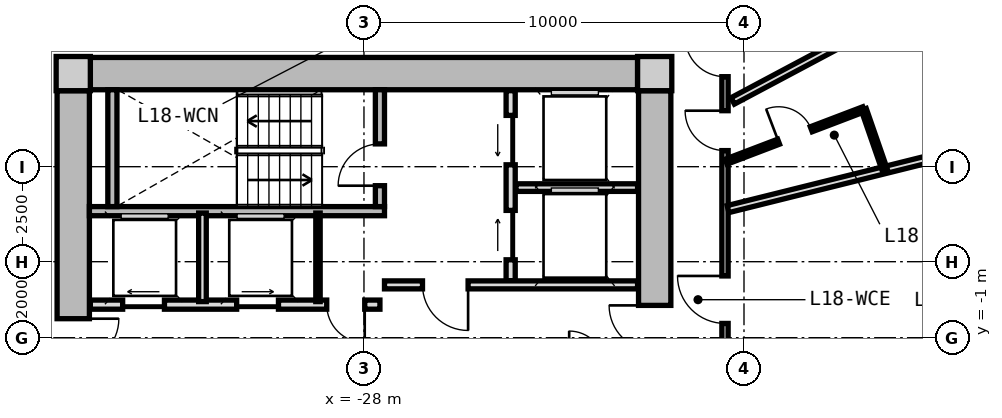
"""IFC4 building model, lengths in metres.
Left out: names, types, materials, properties, quantities, classifications, styles, units other than length and angle.
Written with IfcOpenShell. Run it as: python <this file> out.ifc"""

import sys

from ifc_helpers import new_model, si_unit, direction, frame, frame_2d, origin, origin_2d, place, context, subcontext, project, spatial, rectangle, extrude, source, transform, mapped, element, fill, save


model = new_model("IFC4")
c1 = context("Model", 3, precision=1e-05, world=origin(), true_north=direction((0.0, 1.0)))
c2 = subcontext(c1, "Body", "Model", "MODEL_VIEW")
j1 = project(units=[si_unit("LENGTHUNIT", "METRE"), si_unit("PLANEANGLEUNIT", "RADIAN")], contexts=[c1])
p1 = place(None, origin())
s1 = spatial("IfcSite", under=j1, at=p1, CompositionType="ELEMENT")
p2 = place(p1, origin())
s2 = spatial("IfcBuilding", under=s1, at=p2, CompositionType="ELEMENT")
p3 = place(p2, frame((0.0, 0.0, 61.25)))
s3 = spatial("IfcBuildingStorey", under=s2, at=p3, CompositionType="ELEMENT", Elevation=61.25)
m1 = source(origin(), c2, "Body", "SweptSolid", [
    extrude(rectangle(XDim=0.9, YDim=0.9, at=origin_2d()), origin(), (0.0, 0.0, 1.0), 3.05),
])
for number, where, z_axis, x_axis in (
    (1, (-20.35, 5.95, 0.0), (0.0, 0.0, 1.0), (1.0, 0.0, 0.0)),
    (2, (-35.65, 5.95, 0.0), (0.0, 0.0, 1.0), (1.0, 0.0, 0.0)),
):
    element("IfcColumn", number, at=place(p3, frame(where, z_axis=z_axis, x_axis=x_axis)), inside=s3, PredefinedType="COLUMN", context=c2, shape_type="MappedRepresentation", body=[
        mapped(m1, transform((0.0, 0.0, 0.0), x_axis=(1.0, 0.0, 0.0), y_axis=(0.0, 1.0, 0.0), z_axis=(0.0, 0.0, 1.0), scale=1.0)),
    ])
m2 = source(origin(), c2, "Body", "SweptSolid", [
    extrude(rectangle(XDim=14.4, YDim=0.85, at=frame_2d((7.2, 0.0))), origin(), (0.0, 0.0, 1.0), 2.79),
])
p4 = place(p3, frame((-35.2, 5.95, 0.0), z_axis=(0.0, 0.0, 1.0), x_axis=(1.0, 0.0, 0.0)))
e3 = element("IfcWall", 3, at=p4, inside=s3, PredefinedType="SHEAR", context=c2, shape_type="MappedRepresentation", body=[
    mapped(m2, transform((0.0, 0.0, 0.0), x_axis=(1.0, 0.0, 0.0), y_axis=(0.0, 1.0, 0.0), z_axis=(0.0, 0.0, 1.0), scale=1.0)),
])
m3 = source(origin(), c2, "Body", "SweptSolid", [
    extrude(rectangle(XDim=11.0, YDim=0.85, at=frame_2d((5.5, 0.0))), origin(), (0.0, 0.0, 1.0), 2.79),
])
p5 = place(p3, frame((-35.65, -5.5, 0.0), z_axis=(0.0, 0.0, 1.0), x_axis=(0.0, 1.0, 0.0)))
e4 = element("IfcWall", 4, at=p5, inside=s3, PredefinedType="SHEAR", context=c2, shape_type="MappedRepresentation", body=[
    mapped(m3, transform((0.0, 0.0, 0.0), x_axis=(1.0, 0.0, 0.0), y_axis=(0.0, 1.0, 0.0), z_axis=(0.0, 0.0, 1.0), scale=1.0)),
])
p6 = place(p5, frame((3.8, 0.0, 0.0)))
e5 = element("IfcOpeningElement", 5, at=p6, cuts=e4, PredefinedType="OPENING", context=c2, shape_type="SweptSolid", body=[
    extrude(rectangle(XDim=1.2, YDim=2.15, at=frame_2d((0.6, 1.075))), frame((0.0, 0.435, 0.0), z_axis=(0.0, -1.0, 0.0), x_axis=(1.0, 0.0, 0.0)), (0.0, 0.0, 1.0), 0.87),
])
p7 = place(p3, frame((-20.35, 5.5, 0.0), z_axis=(0.0, 0.0, 1.0), x_axis=(0.0, -1.0, 0.0)))
e6 = element("IfcWall", 6, at=p7, inside=s3, PredefinedType="SHEAR", context=c2, shape_type="MappedRepresentation", body=[
    mapped(m3, transform((0.0, 0.0, 0.0), x_axis=(1.0, 0.0, 0.0), y_axis=(0.0, 1.0, 0.0), z_axis=(0.0, 0.0, 1.0), scale=1.0)),
])
p8 = place(p7, frame((5.65, 0.0, 0.0)))
e7 = element("IfcOpeningElement", 7, at=p8, cuts=e6, PredefinedType="OPENING", context=c2, shape_type="SweptSolid", body=[
    extrude(rectangle(XDim=1.2, YDim=2.15, at=frame_2d((0.6, 1.075))), frame((0.0, 0.435, 0.0), z_axis=(0.0, -1.0, 0.0), x_axis=(1.0, 0.0, 0.0)), (0.0, 0.0, 1.0), 0.87),
])
m4 = source(origin(), c2, "Body", "SweptSolid", [
    extrude(rectangle(XDim=7.765, YDim=0.24, at=frame_2d((3.883, 0.0))), origin(), (0.0, 0.0, 1.0), 2.79),
])
p9 = place(p3, frame((-35.225, 2.33, 0.0), z_axis=(0.0, 0.0, 1.0), x_axis=(1.0, 0.0, 0.0)))
e8 = element("IfcWall", 8, at=p9, inside=s3, PredefinedType="PARTITIONING", context=c2, shape_type="MappedRepresentation", body=[
    mapped(m4, transform((0.0, 0.0, 0.0), x_axis=(1.0, 0.0, 0.0), y_axis=(0.0, 1.0, 0.0), z_axis=(0.0, 0.0, 1.0), scale=1.0)),
])
m5 = source(origin(), c2, "Body", "SweptSolid", [
    extrude(rectangle(XDim=3.075, YDim=0.24, at=frame_2d((1.538, 0.0))), origin(), (0.0, 0.0, 1.0), 2.79),
])
p10 = place(p3, frame((-34.62, 2.45, 0.0), z_axis=(0.0, 0.0, 1.0), x_axis=(0.0, 1.0, 0.0)))
e9 = element("IfcWall", 9, at=p10, inside=s3, PredefinedType="PARTITIONING", context=c2, shape_type="MappedRepresentation", body=[
    mapped(m5, transform((0.0, 0.0, 0.0), x_axis=(1.0, 0.0, 0.0), y_axis=(0.0, 1.0, 0.0), z_axis=(0.0, 0.0, 1.0), scale=1.0)),
])
p11 = place(p3, frame((-27.58, 2.45, 0.0), z_axis=(0.0, 0.0, 1.0), x_axis=(0.0, 1.0, 0.0)))
e10 = element("IfcWall", 10, at=p11, inside=s3, PredefinedType="PARTITIONING", context=c2, shape_type="MappedRepresentation", body=[
    mapped(m5, transform((0.0, 0.0, 0.0), x_axis=(1.0, 0.0, 0.0), y_axis=(0.0, 1.0, 0.0), z_axis=(0.0, 0.0, 1.0), scale=1.0)),
])
p12 = place(p11, frame((0.55, 0.0, 0.0)))
e11 = element("IfcOpeningElement", 11, at=p12, cuts=e10, PredefinedType="OPENING", context=c2, shape_type="SweptSolid", body=[
    extrude(rectangle(XDim=1.1, YDim=2.15, at=frame_2d((0.55, 1.075))), frame((0.0, 0.13, 0.0), z_axis=(0.0, -1.0, 0.0), x_axis=(1.0, 0.0, 0.0)), (0.0, 0.0, 1.0), 0.26),
])
m6 = source(origin(), c2, "Body", "SweptSolid", [
    extrude(rectangle(XDim=5.0, YDim=0.24, at=frame_2d((2.5, 0.0))), origin(), (0.0, 0.0, 1.0), 2.775),
])
p13 = place(p3, frame((-24.14, 0.5, 0.0), z_axis=(0.0, 0.0, 1.0), x_axis=(0.0, 1.0, 0.0)))
e12 = element("IfcWall", 12, at=p13, inside=s3, PredefinedType="PARTITIONING", context=c2, shape_type="MappedRepresentation", body=[
    mapped(m6, transform((0.0, 0.0, 0.0), x_axis=(1.0, 0.0, 0.0), y_axis=(0.0, 1.0, 0.0), z_axis=(0.0, 0.0, 1.0), scale=1.0)),
])
p14 = place(p13, frame((3.05, 0.0, 0.0)))
e13 = element("IfcOpeningElement", 13, at=p14, cuts=e12, PredefinedType="OPENING", context=c2, shape_type="SweptSolid", body=[
    extrude(rectangle(XDim=1.3, YDim=2.2, at=frame_2d((0.65, 1.1))), frame((0.0, 0.13, 0.0), z_axis=(0.0, -1.0, 0.0), x_axis=(1.0, 0.0, 0.0)), (0.0, 0.0, 1.0), 0.26),
])
p15 = place(p13, frame((0.55, 0.0, 0.0)))
e14 = element("IfcOpeningElement", 14, at=p15, cuts=e12, PredefinedType="OPENING", context=c2, shape_type="SweptSolid", body=[
    extrude(rectangle(XDim=1.3, YDim=2.2, at=frame_2d((0.65, 1.1))), frame((0.0, 0.13, 0.0), z_axis=(0.0, -1.0, 0.0), x_axis=(1.0, 0.0, 0.0)), (0.0, 0.0, 1.0), 0.26),
])
m7 = source(origin(), c2, "Body", "SweptSolid", [
    extrude(rectangle(XDim=3.2, YDim=0.2, at=frame_2d((1.6, 0.0))), origin(), (0.0, 0.0, 1.0), 2.775),
])
p16 = place(p3, frame((-24.0, 2.95, 0.0), z_axis=(0.0, 0.0, 1.0), x_axis=(1.0, 0.0, 0.0)))
e15 = element("IfcWall", 15, at=p16, inside=s3, PredefinedType="PARTITIONING", context=c2, shape_type="MappedRepresentation", body=[
    mapped(m7, transform((0.0, 0.0, 0.0), x_axis=(1.0, 0.0, 0.0), y_axis=(0.0, 1.0, 0.0), z_axis=(0.0, 0.0, 1.0), scale=1.0)),
])
m8 = source(origin(), c2, "Body", "SweptSolid", [
    extrude(rectangle(XDim=6.66, YDim=0.21, at=frame_2d((3.33, 0.0))), origin(), (0.0, 0.0, 1.0), 2.775),
])
p17 = place(p3, frame((-27.46, 0.39, 0.0), z_axis=(0.0, 0.0, 1.0), x_axis=(1.0, 0.0, 0.0)))
e16 = element("IfcWall", 16, at=p17, inside=s3, PredefinedType="PARTITIONING", context=c2, shape_type="MappedRepresentation", body=[
    mapped(m8, transform((0.0, 0.0, 0.0), x_axis=(1.0, 0.0, 0.0), y_axis=(0.0, 1.0, 0.0), z_axis=(0.0, 0.0, 1.0), scale=1.0)),
])
p18 = place(p17, frame((1.0, 0.0, 0.0)))
e17 = element("IfcOpeningElement", 17, at=p18, cuts=e16, PredefinedType="OPENING", context=c2, shape_type="SweptSolid", body=[
    extrude(rectangle(XDim=1.2, YDim=2.15, at=frame_2d((0.6, 1.075))), frame((0.0, 0.115, 0.0), z_axis=(0.0, -1.0, 0.0), x_axis=(1.0, 0.0, 0.0)), (0.0, 0.0, 1.0), 0.23),
])
m9 = source(origin(), c2, "Body", "SweptSolid", [
    extrude(rectangle(XDim=7.62, YDim=0.24, at=frame_2d((3.81, 0.0))), origin(), (0.0, 0.0, 1.0), 2.775),
])
p19 = place(p3, frame((-35.2, -0.13, 0.0), z_axis=(0.0, 0.0, 1.0), x_axis=(1.0, 0.0, 0.0)))
e18 = element("IfcWall", 18, at=p19, inside=s3, PredefinedType="PARTITIONING", context=c2, shape_type="MappedRepresentation", body=[
    mapped(m9, transform((0.0, 0.0, 0.0), x_axis=(1.0, 0.0, 0.0), y_axis=(0.0, 1.0, 0.0), z_axis=(0.0, 0.0, 1.0), scale=1.0)),
])
p20 = place(p19, frame((6.22, 0.0, 0.0)))
e19 = element("IfcOpeningElement", 19, at=p20, cuts=e18, PredefinedType="OPENING", context=c2, shape_type="SweptSolid", body=[
    extrude(rectangle(XDim=1.0, YDim=2.1, at=frame_2d((0.5, 1.05))), frame((0.0, 0.13, 0.0), z_axis=(0.0, -1.0, 0.0), x_axis=(1.0, 0.0, 0.0)), (0.0, 0.0, 1.0), 0.26),
])
p21 = place(p19, frame((0.85, 0.0, 0.0)))
e20 = element("IfcOpeningElement", 20, at=p21, cuts=e18, PredefinedType="OPENING", context=c2, shape_type="SweptSolid", body=[
    extrude(rectangle(XDim=1.1, YDim=2.2, at=frame_2d((0.55, 1.1))), frame((0.0, 0.13, 0.0), z_axis=(0.0, -1.0, 0.0), x_axis=(1.0, 0.0, 0.0)), (0.0, 0.0, 1.0), 0.26),
])
p22 = place(p19, frame((3.85, 0.0, 0.0)))
e21 = element("IfcOpeningElement", 21, at=p22, cuts=e18, PredefinedType="OPENING", context=c2, shape_type="SweptSolid", body=[
    extrude(rectangle(XDim=1.1, YDim=2.2, at=frame_2d((0.55, 1.1))), frame((0.0, 0.13, 0.0), z_axis=(0.0, -1.0, 0.0), x_axis=(1.0, 0.0, 0.0)), (0.0, 0.0, 1.0), 0.26),
])
m10 = source(origin(), c2, "Body", "SweptSolid", [
    extrude(rectangle(XDim=2.33, YDim=0.115, at=frame_2d((1.165, 0.0))), origin(), (0.0, 0.0, 1.0), 2.775),
])
p23 = place(p3, frame((-29.21, -0.05, 0.0), z_axis=(0.0, 0.0, 1.0), x_axis=(0.0, 1.0, 0.0)))
e22 = element("IfcWall", 22, at=p23, inside=s3, PredefinedType="PARTITIONING", context=c2, shape_type="MappedRepresentation", body=[
    mapped(m10, transform((0.0, 0.0, 0.0), x_axis=(1.0, 0.0, 0.0), y_axis=(0.0, 1.0, 0.0), z_axis=(0.0, 0.0, 1.0), scale=1.0)),
])
m11 = source(origin(), c2, "Body", "SweptSolid", [
    extrude(rectangle(XDim=2.33, YDim=0.2, at=frame_2d((1.165, 0.0))), origin(), (0.0, 0.0, 1.0), 2.775),
])
p24 = place(p3, frame((-32.25, -0.05, 0.0), z_axis=(0.0, 0.0, 1.0), x_axis=(0.0, 1.0, 0.0)))
e23 = element("IfcWall", 23, at=p24, inside=s3, PredefinedType="PARTITIONING", context=c2, shape_type="MappedRepresentation", body=[
    mapped(m11, transform((0.0, 0.0, 0.0), x_axis=(1.0, 0.0, 0.0), y_axis=(0.0, 1.0, 0.0), z_axis=(0.0, 0.0, 1.0), scale=1.0)),
])
m12 = source(origin(), c2, "Body", "SweptSolid", [
    extrude(rectangle(XDim=15.6, YDim=0.165, at=frame_2d((7.8, 0.0))), origin(), (0.0, 0.0, 1.0), 2.775),
])
p25 = place(p3, frame((-18.5, 7.8, 0.0), z_axis=(0.0, 0.0, 1.0), x_axis=(0.0, -1.0, 0.0)))
e24 = element("IfcWall", 24, at=p25, inside=s3, PredefinedType="PARTITIONING", context=c2, shape_type="MappedRepresentation", body=[
    mapped(m12, transform((0.0, 0.0, 0.0), x_axis=(1.0, 0.0, 0.0), y_axis=(0.0, 1.0, 0.0), z_axis=(0.0, 0.0, 1.0), scale=1.0)),
])
p26 = place(p25, frame((12.141, 0.0, 0.0)))
e25 = element("IfcOpeningElement", 25, at=p26, cuts=e24, PredefinedType="OPENING", context=c2, shape_type="SweptSolid", body=[
    extrude(rectangle(XDim=1.25, YDim=2.2, at=frame_2d((0.625, 1.1))), frame((0.0, 0.093, 0.0), z_axis=(0.0, -1.0, 0.0), x_axis=(1.0, 0.0, 0.0)), (0.0, 0.0, 1.0), 0.185),
])
p27 = place(p25, frame((7.175, 0.0, 0.0)))
e26 = element("IfcOpeningElement", 26, at=p27, cuts=e24, PredefinedType="OPENING", context=c2, shape_type="SweptSolid", body=[
    extrude(rectangle(XDim=1.25, YDim=2.2, at=frame_2d((0.625, 1.1))), frame((0.0, 0.093, 0.0), z_axis=(0.0, -1.0, 0.0), x_axis=(1.0, 0.0, 0.0)), (0.0, 0.0, 1.0), 0.185),
])
p28 = place(p25, frame((2.826, 0.0, 0.0)))
e27 = element("IfcOpeningElement", 27, at=p28, cuts=e24, PredefinedType="OPENING", context=c2, shape_type="SweptSolid", body=[
    extrude(rectangle(XDim=1.05, YDim=2.15, at=frame_2d((0.525, 1.075))), frame((0.0, 0.093, 0.0), z_axis=(0.0, -1.0, 0.0), x_axis=(1.0, 0.0, 0.0)), (0.0, 0.0, 1.0), 0.185),
])
p29 = place(p25, frame((0.881, 0.0, 0.0)))
e28 = element("IfcOpeningElement", 28, at=p29, cuts=e24, PredefinedType="OPENING", context=c2, shape_type="SweptSolid", body=[
    extrude(rectangle(XDim=1.05, YDim=2.15, at=frame_2d((0.525, 1.075))), frame((0.0, 0.093, 0.0), z_axis=(0.0, -1.0, 0.0), x_axis=(1.0, 0.0, 0.0)), (0.0, 0.0, 1.0), 0.185),
])
m13 = source(origin(), c2, "Body", "SweptSolid", [
    extrude(rectangle(XDim=9.737, YDim=0.19, at=frame_2d((4.869, 0.0))), origin(), (0.0, 0.0, 1.0), 2.225),
])
p30 = place(p3, frame((-18.42, 2.385, 0.0), z_axis=(0.0, 0.0, 1.0), x_axis=(0.970392716238, 0.241532557375, 0.0)))
e29 = element("IfcWall", 29, at=p30, inside=s3, PredefinedType="PARTITIONING", context=c2, shape_type="MappedRepresentation", body=[
    mapped(m13, transform((0.0, 0.0, 0.0), x_axis=(1.0, 0.0, 0.0), y_axis=(0.0, 1.0, 0.0), z_axis=(0.0, 0.0, 1.0), scale=1.0)),
])
m14 = source(origin(), c2, "Body", "SweptSolid", [
    extrude(rectangle(XDim=7.677, YDim=0.19, at=frame_2d((3.838, 0.0))), origin(), (0.0, 0.0, 1.0), 2.775),
])
p31 = place(p3, frame((-18.297, 5.231, 0.0), z_axis=(0.0, 0.0, 1.0), x_axis=(0.882725057546, 0.469889851753, 0.0)))
e30 = element("IfcWall", 30, at=p31, inside=s3, PredefinedType="PARTITIONING", context=c2, shape_type="MappedRepresentation", body=[
    mapped(m14, transform((0.0, 0.0, 0.0), x_axis=(1.0, 0.0, 0.0), y_axis=(0.0, 1.0, 0.0), z_axis=(0.0, 0.0, 1.0), scale=1.0)),
])
m15 = source(origin(), c2, "Body", "SweptSolid", [
    extrude(rectangle(XDim=3.874, YDim=0.14, at=frame_2d((1.937, 0.0))), origin(), (0.0, 0.0, 1.0), 2.775),
])
p32 = place(p3, frame((-18.47, 3.632, 0.0), z_axis=(0.0, 0.0, 1.0), x_axis=(0.934461775659, 0.35606346321, 0.0)))
e31 = element("IfcWall", 31, at=p32, inside=s3, PredefinedType="PARTITIONING", context=c2, shape_type="MappedRepresentation", body=[
    mapped(m15, transform((0.0, 0.0, 0.0), x_axis=(1.0, 0.0, 0.0), y_axis=(0.0, 1.0, 0.0), z_axis=(0.0, 0.0, 1.0), scale=1.0)),
])
p33 = place(p32, frame((1.477, 0.0, 0.0)))
e32 = element("IfcOpeningElement", 32, at=p33, cuts=e31, PredefinedType="OPENING", context=c2, shape_type="SweptSolid", body=[
    extrude(rectangle(XDim=0.92, YDim=2.1, at=frame_2d((0.46, 1.05))), frame((0.0, 0.08, 0.0), z_axis=(0.0, -1.0, 0.0), x_axis=(1.0, 0.0, 0.0)), (0.0, 0.0, 1.0), 0.16),
])
m16 = source(origin(), c2, "Body", "SweptSolid", [
    extrude(rectangle(XDim=1.676, YDim=0.14, at=frame_2d((0.838, 0.0))), origin(), (0.0, 0.0, 1.0), 2.775),
])
p34 = place(p3, frame((-14.85, 5.011, 0.0), z_axis=(0.0, 0.0, 1.0), x_axis=(0.327785970556, -0.944752008469, 0.0)))
e33 = element("IfcWall", 33, at=p34, inside=s3, PredefinedType="PARTITIONING", context=c2, shape_type="MappedRepresentation", body=[
    mapped(m16, transform((0.0, 0.0, 0.0), x_axis=(1.0, 0.0, 0.0), y_axis=(0.0, 1.0, 0.0), z_axis=(0.0, 0.0, 1.0), scale=1.0)),
])
m17 = source(origin(), c2, "Body", "SweptSolid", [
    extrude(rectangle(XDim=1.1, YDim=2.15, at=frame_2d((0.55, 1.075))), frame((0.0, 0.025, 0.0), z_axis=(0.0, -1.0, 0.0), x_axis=(1.0, 0.0, 0.0)), (0.0, 0.0, 1.0), 0.05),
])
p35 = place(p12, origin())
e34 = element("IfcDoor", 34, at=p35, inside=s3, OperationType="SINGLE_SWING_LEFT", PredefinedType="DOOR", context=c2, shape_type="MappedRepresentation", body=[
    mapped(m17, transform((0.0, 0.0, 0.0), x_axis=(1.0, 0.0, 0.0), y_axis=(0.0, 1.0, 0.0), z_axis=(0.0, 0.0, 1.0), scale=1.0)),
])
fill(e11, e34)
m18 = source(origin(), c2, "Body", "SweptSolid", [
    extrude(rectangle(XDim=1.3, YDim=2.2, at=frame_2d((0.65, 1.1))), frame((0.0, 0.025, 0.0), z_axis=(0.0, -1.0, 0.0), x_axis=(1.0, 0.0, 0.0)), (0.0, 0.0, 1.0), 0.05),
])
p36 = place(p14, origin())
e35 = element("IfcDoor", 35, at=p36, inside=s3, OperationType="SLIDING_TO_LEFT", PredefinedType="DOOR", context=c2, shape_type="MappedRepresentation", body=[
    mapped(m18, transform((0.0, 0.0, 0.0), x_axis=(1.0, 0.0, 0.0), y_axis=(0.0, 1.0, 0.0), z_axis=(0.0, 0.0, 1.0), scale=1.0)),
])
fill(e13, e35)
p37 = place(p15, origin())
e36 = element("IfcDoor", 36, at=p37, inside=s3, OperationType="SLIDING_TO_RIGHT", PredefinedType="DOOR", context=c2, shape_type="MappedRepresentation", body=[
    mapped(m18, transform((0.0, 0.0, 0.0), x_axis=(1.0, 0.0, 0.0), y_axis=(0.0, 1.0, 0.0), z_axis=(0.0, 0.0, 1.0), scale=1.0)),
])
fill(e14, e36)
m19 = source(origin(), c2, "Body", "SweptSolid", [
    extrude(rectangle(XDim=1.2, YDim=2.15, at=frame_2d((0.6, 1.075))), frame((0.0, 0.025, 0.0), z_axis=(0.0, -1.0, 0.0), x_axis=(1.0, 0.0, 0.0)), (0.0, 0.0, 1.0), 0.05),
])
p38 = place(p18, frame((1.2, 0.0, 0.0), z_axis=(0.0, 0.0, 1.0), x_axis=(-1.0, 0.0, 0.0)))
e37 = element("IfcDoor", 37, at=p38, inside=s3, OperationType="SINGLE_SWING_LEFT", PredefinedType="DOOR", context=c2, shape_type="MappedRepresentation", body=[
    mapped(m19, transform((0.0, 0.0, 0.0), x_axis=(1.0, 0.0, 0.0), y_axis=(0.0, 1.0, 0.0), z_axis=(0.0, 0.0, 1.0), scale=1.0)),
])
fill(e17, e37)
p39 = place(p6, frame((1.2, 0.0, 0.0), z_axis=(0.0, 0.0, 1.0), x_axis=(-1.0, 0.0, 0.0)))
e38 = element("IfcDoor", 38, at=p39, inside=s3, OperationType="SINGLE_SWING_LEFT", PredefinedType="DOOR", context=c2, shape_type="MappedRepresentation", body=[
    mapped(m19, transform((0.0, 0.0, 0.0), x_axis=(1.0, 0.0, 0.0), y_axis=(0.0, 1.0, 0.0), z_axis=(0.0, 0.0, 1.0), scale=1.0)),
])
fill(e5, e38)
p40 = place(p8, frame((1.2, 0.0, 0.0), z_axis=(0.0, 0.0, 1.0), x_axis=(-1.0, 0.0, 0.0)))
e39 = element("IfcDoor", 39, at=p40, inside=s3, OperationType="SINGLE_SWING_RIGHT", PredefinedType="DOOR", context=c2, shape_type="MappedRepresentation", body=[
    mapped(m19, transform((0.0, 0.0, 0.0), x_axis=(1.0, 0.0, 0.0), y_axis=(0.0, 1.0, 0.0), z_axis=(0.0, 0.0, 1.0), scale=1.0)),
])
fill(e7, e39)
m20 = source(origin(), c2, "Body", "SweptSolid", [
    extrude(rectangle(XDim=1.0, YDim=2.1, at=frame_2d((0.5, 1.05))), frame((0.0, 0.025, 0.0), z_axis=(0.0, -1.0, 0.0), x_axis=(1.0, 0.0, 0.0)), (0.0, 0.0, 1.0), 0.05),
])
p41 = place(p20, frame((1.0, 0.0, 0.0), z_axis=(0.0, 0.0, 1.0), x_axis=(-1.0, 0.0, 0.0)))
e40 = element("IfcDoor", 40, at=p41, inside=s3, OperationType="SINGLE_SWING_LEFT", PredefinedType="DOOR", context=c2, shape_type="MappedRepresentation", body=[
    mapped(m20, transform((0.0, 0.0, 0.0), x_axis=(1.0, 0.0, 0.0), y_axis=(0.0, 1.0, 0.0), z_axis=(0.0, 0.0, 1.0), scale=1.0)),
])
fill(e19, e40)
m21 = source(origin(), c2, "Body", "SweptSolid", [
    extrude(rectangle(XDim=1.1, YDim=2.2, at=frame_2d((0.55, 1.1))), frame((0.0, 0.025, 0.0), z_axis=(0.0, -1.0, 0.0), x_axis=(1.0, 0.0, 0.0)), (0.0, 0.0, 1.0), 0.05),
])
p42 = place(p21, origin())
e41 = element("IfcDoor", 41, at=p42, inside=s3, OperationType="SLIDING_TO_LEFT", PredefinedType="DOOR", context=c2, shape_type="MappedRepresentation", body=[
    mapped(m21, transform((0.0, 0.0, 0.0), x_axis=(1.0, 0.0, 0.0), y_axis=(0.0, 1.0, 0.0), z_axis=(0.0, 0.0, 1.0), scale=1.0)),
])
fill(e20, e41)
p43 = place(p22, origin())
e42 = element("IfcDoor", 42, at=p43, inside=s3, OperationType="SLIDING_TO_RIGHT", PredefinedType="DOOR", context=c2, shape_type="MappedRepresentation", body=[
    mapped(m21, transform((0.0, 0.0, 0.0), x_axis=(1.0, 0.0, 0.0), y_axis=(0.0, 1.0, 0.0), z_axis=(0.0, 0.0, 1.0), scale=1.0)),
])
fill(e21, e42)
m22 = source(origin(), c2, "Body", "SweptSolid", [
    extrude(rectangle(XDim=1.25, YDim=2.2, at=frame_2d((0.625, 1.1))), frame((0.0, 0.025, 0.0), z_axis=(0.0, -1.0, 0.0), x_axis=(1.0, 0.0, 0.0)), (0.0, 0.0, 1.0), 0.05),
])
p44 = place(p27, frame((1.25, 0.0, 0.0), z_axis=(0.0, 0.0, 1.0), x_axis=(-1.0, 0.0, 0.0)))
e43 = element("IfcDoor", 43, at=p44, inside=s3, OperationType="SINGLE_SWING_RIGHT", PredefinedType="DOOR", context=c2, shape_type="MappedRepresentation", body=[
    mapped(m22, transform((0.0, 0.0, 0.0), x_axis=(1.0, 0.0, 0.0), y_axis=(0.0, 1.0, 0.0), z_axis=(0.0, 0.0, 1.0), scale=1.0)),
])
fill(e26, e43)
m23 = source(origin(), c2, "Body", "SweptSolid", [
    extrude(rectangle(XDim=1.05, YDim=2.15, at=frame_2d((0.525, 1.075))), frame((0.0, 0.025, 0.0), z_axis=(0.0, -1.0, 0.0), x_axis=(1.0, 0.0, 0.0)), (0.0, 0.0, 1.0), 0.05),
])
p45 = place(p28, frame((1.05, 0.0, 0.0), z_axis=(0.0, 0.0, 1.0), x_axis=(-1.0, 0.0, 0.0)))
e44 = element("IfcDoor", 44, at=p45, inside=s3, OperationType="SINGLE_SWING_RIGHT", PredefinedType="DOOR", context=c2, shape_type="MappedRepresentation", body=[
    mapped(m23, transform((0.0, 0.0, 0.0), x_axis=(1.0, 0.0, 0.0), y_axis=(0.0, 1.0, 0.0), z_axis=(0.0, 0.0, 1.0), scale=1.0)),
])
fill(e27, e44)
m24 = source(origin(), c2, "Body", "SweptSolid", [
    extrude(rectangle(XDim=0.92, YDim=2.1, at=frame_2d((0.46, 1.05))), frame((0.0, 0.025, 0.0), z_axis=(0.0, -1.0, 0.0), x_axis=(1.0, 0.0, 0.0)), (0.0, 0.0, 1.0), 0.05),
])
p46 = place(p33, origin())
e45 = element("IfcDoor", 45, at=p46, inside=s3, OperationType="SINGLE_SWING_LEFT", PredefinedType="DOOR", context=c2, shape_type="MappedRepresentation", body=[
    mapped(m24, transform((0.0, 0.0, 0.0), x_axis=(1.0, 0.0, 0.0), y_axis=(0.0, 1.0, 0.0), z_axis=(0.0, 0.0, 1.0), scale=1.0)),
])
fill(e32, e45)
p47 = place(p29, frame((1.05, 0.0, 0.0), z_axis=(0.0, 0.0, 1.0), x_axis=(-1.0, 0.0, 0.0)))
e46 = element("IfcDoor", 46, at=p47, inside=s3, OperationType="SINGLE_SWING_RIGHT", PredefinedType="DOOR", context=c2, shape_type="MappedRepresentation", body=[
    mapped(m23, transform((0.0, 0.0, 0.0), x_axis=(1.0, 0.0, 0.0), y_axis=(0.0, 1.0, 0.0), z_axis=(0.0, 0.0, 1.0), scale=1.0)),
])
fill(e28, e46)
save(model, sys.argv[1])
